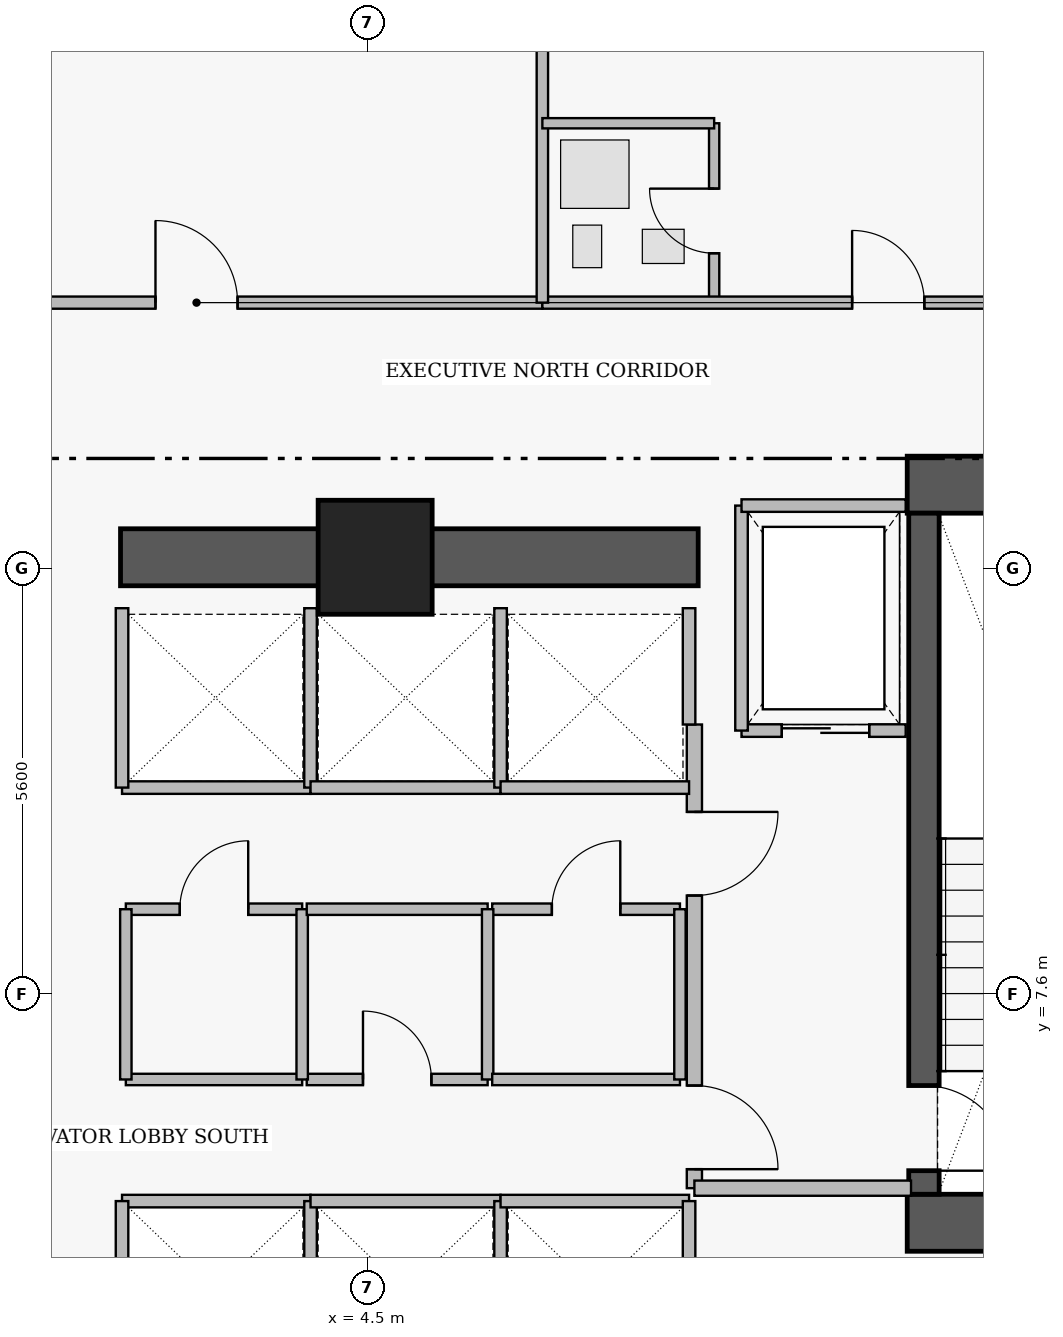
"""IFC4 building model, lengths in metres.
Left out: names, types, materials, properties, quantities, classifications, styles, units other than length and angle.
Written with IfcOpenShell. Run it as: python <this file> out.ifc"""

import sys

from ifc_helpers import new_model, si_unit, direction, frame, frame_2d, origin, origin_2d, place, context, subcontext, project, spatial, rectangle, extrude, element, fill, save


model = new_model("IFC4")
c1 = context("Model", 3, precision=1e-05, world=origin(), true_north=direction((0.0, 1.0)))
c2 = subcontext(c1, "Body", "Model", "MODEL_VIEW")
j1 = project(units=[si_unit("LENGTHUNIT", "METRE"), si_unit("PLANEANGLEUNIT", "RADIAN")], contexts=[c1])
p1 = place(None, origin())
s1 = spatial("IfcSite", under=j1, at=p1, CompositionType="ELEMENT")
p2 = place(p1, origin())
s2 = spatial("IfcBuilding", under=s1, at=p2, CompositionType="ELEMENT")
p3 = place(p2, frame((0.0, 0.0, 128.5)))
s3 = spatial("IfcBuildingStorey", under=s2, at=p3, CompositionType="ELEMENT", Elevation=128.5)
for number, where, z_axis, x_axis in (
    (1, (11.6, 14.305, 0.0), (0.0, 0.0, 1.0), (1.0, 0.0, 0.0)),
    (2, (11.6, 4.595, 0.0), (0.0, 0.0, 1.0), (1.0, 0.0, 0.0)),
):
    element("IfcWall", number, at=place(p3, frame(where, z_axis=z_axis, x_axis=x_axis)), inside=s3, PredefinedType="SHEAR", context=c2, shape_type="SweptSolid", body=[
        extrude(rectangle(XDim=4.56, YDim=0.75, at=frame_2d((2.28, 0.0))), origin(), (0.0, 0.0, 1.0), 3.46),
    ])
p4 = place(p3, frame((1.25, 13.35, 0.0), z_axis=(0.0, 0.0, 1.0), x_axis=(1.0, 0.0, 0.0)))
e3 = element("IfcWall", 3, at=p4, inside=s3, PredefinedType="SHEAR", context=c2, shape_type="SweptSolid", body=[
    extrude(rectangle(XDim=7.6, YDim=0.75, at=frame_2d((3.8, 0.0))), origin(), (0.0, 0.0, 1.0), 3.43),
])
p5 = place(p3, frame((11.82, 13.93, 0.0), z_axis=(0.0, 0.0, 1.0), x_axis=(0.0, -1.0, 0.0)))
e4 = element("IfcWall", 4, at=p5, inside=s3, PredefinedType="SHEAR", context=c2, shape_type="SweptSolid", body=[
    extrude(rectangle(XDim=8.96, YDim=0.4, at=frame_2d((4.48, 0.0))), origin(), (0.0, 0.0, 1.0), 3.46),
])
p6 = place(p5, frame((7.53, 0.0, 0.0)))
e5 = element("IfcOpeningElement", 5, at=p6, cuts=e4, PredefinedType="OPENING", context=c2, shape_type="SweptSolid", body=[
    extrude(rectangle(XDim=1.12, YDim=2.22, at=frame_2d((0.56, 1.11))), frame((0.0, 0.21, 0.0), z_axis=(0.0, -1.0, 0.0), x_axis=(1.0, 0.0, 0.0)), (0.0, 0.0, 1.0), 0.42),
])
p7 = place(p3, frame((4.6, 13.35, 0.0), z_axis=(0.0, 0.0, 1.0), x_axis=(1.0, 0.0, 0.0)))
e6 = element("IfcColumn", 6, at=p7, inside=s3, PredefinedType="COLUMN", context=c2, shape_type="SweptSolid", body=[
    extrude(rectangle(XDim=1.5, YDim=1.5, at=origin_2d()), origin(), (0.0, 0.0, 1.0), 3.65),
])
p8 = place(p3, frame((8.8, 11.15, 0.0), z_axis=(0.0, 0.0, 1.0), x_axis=(0.0, -1.0, 0.0)))
e7 = element("IfcWall", 7, at=p8, inside=s3, PredefinedType="PARTITIONING", context=c2, shape_type="SweptSolid", body=[
    extrude(rectangle(XDim=6.1, YDim=0.2, at=frame_2d((3.05, 0.0))), origin(), (0.0, 0.0, 1.0), 3.43),
])
p9 = place(p8, frame((1.15, 0.0, 0.0)))
e8 = element("IfcOpeningElement", 8, at=p9, cuts=e7, PredefinedType="OPENING", context=c2, shape_type="SweptSolid", body=[
    extrude(rectangle(XDim=1.1, YDim=2.2, at=frame_2d((0.55, 1.1))), frame((0.0, 0.11, 0.0), z_axis=(0.0, -1.0, 0.0), x_axis=(1.0, 0.0, 0.0)), (0.0, 0.0, 1.0), 0.22),
])
p10 = place(p8, frame((4.75, 0.0, 0.0)))
e9 = element("IfcOpeningElement", 9, at=p10, cuts=e7, PredefinedType="OPENING", context=c2, shape_type="SweptSolid", body=[
    extrude(rectangle(XDim=1.1, YDim=2.2, at=frame_2d((0.55, 1.1))), frame((0.0, 0.11, 0.0), z_axis=(0.0, -1.0, 0.0), x_axis=(1.0, 0.0, 0.0)), (0.0, 0.0, 1.0), 0.22),
])
p11 = place(p3, frame((9.42, 11.07, 0.0), z_axis=(0.0, 0.0, 1.0), x_axis=(1.0, 0.0, 0.0)))
e10 = element("IfcWall", 10, at=p11, inside=s3, PredefinedType="PARTITIONING", context=c2, shape_type="SweptSolid", body=[
    extrude(rectangle(XDim=2.16, YDim=0.165, at=frame_2d((1.08, 0.0))), origin(), (0.0, 0.0, 1.0), 3.43),
])
p12 = place(p11, frame((0.53, 0.0, 0.0)))
e11 = element("IfcOpeningElement", 11, at=p12, cuts=e10, PredefinedType="OPENING", context=c2, shape_type="SweptSolid", body=[
    extrude(rectangle(XDim=1.15, YDim=2.25, at=frame_2d((0.575, 1.125))), frame((0.0, 0.093, 0.0), z_axis=(0.0, -1.0, 0.0), x_axis=(1.0, 0.0, 0.0)), (0.0, 0.0, 1.0), 0.185),
])
p13 = place(p3, frame((1.32, 8.72, 0.0), z_axis=(0.0, 0.0, 1.0), x_axis=(1.0, 0.0, 0.0)))
e12 = element("IfcWall", 12, at=p13, inside=s3, PredefinedType="PARTITIONING", context=c2, shape_type="SweptSolid", body=[
    extrude(rectangle(XDim=2.32, YDim=0.15, at=frame_2d((1.16, 0.0))), origin(), (0.0, 0.0, 1.0), 3.43),
])
p14 = place(p13, frame((0.71, 0.0, 0.0)))
e13 = element("IfcOpeningElement", 13, at=p14, cuts=e12, PredefinedType="OPENING", context=c2, shape_type="SweptSolid", body=[
    extrude(rectangle(XDim=0.9, YDim=2.15, at=frame_2d((0.45, 1.075))), frame((0.0, 0.085, 0.0), z_axis=(0.0, -1.0, 0.0), x_axis=(1.0, 0.0, 0.0)), (0.0, 0.0, 1.0), 0.17),
])
p15 = place(p3, frame((3.7, 6.48, 0.0), z_axis=(0.0, 0.0, 1.0), x_axis=(1.0, 0.0, 0.0)))
e14 = element("IfcWall", 14, at=p15, inside=s3, PredefinedType="PARTITIONING", context=c2, shape_type="SweptSolid", body=[
    extrude(rectangle(XDim=2.38, YDim=0.15, at=frame_2d((1.19, 0.0))), origin(), (0.0, 0.0, 1.0), 3.43),
])
p16 = place(p15, frame((0.74, 0.0, 0.0)))
e15 = element("IfcOpeningElement", 15, at=p16, cuts=e14, PredefinedType="OPENING", context=c2, shape_type="SweptSolid", body=[
    extrude(rectangle(XDim=0.9, YDim=2.15, at=frame_2d((0.45, 1.075))), frame((0.0, 0.085, 0.0), z_axis=(0.0, -1.0, 0.0), x_axis=(1.0, 0.0, 0.0)), (0.0, 0.0, 1.0), 0.17),
])
p17 = place(p3, frame((6.14, 8.72, 0.0), z_axis=(0.0, 0.0, 1.0), x_axis=(1.0, 0.0, 0.0)))
e16 = element("IfcWall", 16, at=p17, inside=s3, PredefinedType="PARTITIONING", context=c2, shape_type="SweptSolid", body=[
    extrude(rectangle(XDim=2.47, YDim=0.15, at=frame_2d((1.235, 0.0))), origin(), (0.0, 0.0, 1.0), 3.43),
])
p18 = place(p17, frame((0.785, 0.0, 0.0)))
e17 = element("IfcOpeningElement", 17, at=p18, cuts=e16, PredefinedType="OPENING", context=c2, shape_type="SweptSolid", body=[
    extrude(rectangle(XDim=0.9, YDim=2.15, at=frame_2d((0.45, 1.075))), frame((0.0, 0.085, 0.0), z_axis=(0.0, -1.0, 0.0), x_axis=(1.0, 0.0, 0.0)), (0.0, 0.0, 1.0), 0.17),
])
p19 = place(p3, frame((0.0, 16.7, 0.0), z_axis=(0.0, 0.0, 1.0), x_axis=(1.0, 0.0, 0.0)))
e18 = element("IfcWall", 18, at=p19, inside=s3, PredefinedType="PARTITIONING", context=c2, shape_type="SweptSolid", body=[
    extrude(rectangle(XDim=6.8, YDim=0.16, at=frame_2d((3.4, 0.0))), origin(), (0.0, 0.0, 1.0), 2.973),
])
p20 = place(p19, frame((1.71, 0.0, 0.0)))
e19 = element("IfcOpeningElement", 19, at=p20, cuts=e18, PredefinedType="OPENING", context=c2, shape_type="SweptSolid", body=[
    extrude(rectangle(XDim=1.08, YDim=2.18, at=frame_2d((0.54, 1.09))), frame((0.0, 0.09, 0.0), z_axis=(0.0, -1.0, 0.0), x_axis=(1.0, 0.0, 0.0)), (0.0, 0.0, 1.0), 0.18),
])
p21 = place(p3, frame((9.06, 16.7, 0.0), z_axis=(0.0, 0.0, 1.0), x_axis=(0.0, 1.0, 0.0)))
e20 = element("IfcWall", 20, at=p21, inside=s3, PredefinedType="PLUMBINGWALL", context=c2, shape_type="SweptSolid", body=[
    extrude(rectangle(XDim=2.36, YDim=0.135, at=frame_2d((1.18, 0.0))), origin(), (0.0, 0.0, 1.0), 3.43),
])
p22 = place(p21, frame((0.65, 0.0, 0.0)))
e21 = element("IfcOpeningElement", 21, at=p22, cuts=e20, PredefinedType="OPENING", context=c2, shape_type="SweptSolid", body=[
    extrude(rectangle(XDim=0.85, YDim=2.1, at=frame_2d((0.425, 1.05))), frame((0.0, 0.077, 0.0), z_axis=(0.0, -1.0, 0.0), x_axis=(1.0, 0.0, 0.0)), (0.0, 0.0, 1.0), 0.155),
])
p23 = place(p3, frame((6.8, 16.7, 0.0), z_axis=(0.0, 0.0, 1.0), x_axis=(1.0, 0.0, 0.0)))
e22 = element("IfcWall", 22, at=p23, inside=s3, PredefinedType="PARTITIONING", context=c2, shape_type="SweptSolid", body=[
    extrude(rectangle(XDim=6.8, YDim=0.16, at=frame_2d((3.4, 0.0))), origin(), (0.0, 0.0, 1.0), 2.973),
])
p24 = place(p23, frame((4.075, 0.0, 0.0)))
e23 = element("IfcOpeningElement", 23, at=p24, cuts=e22, PredefinedType="OPENING", context=c2, shape_type="SweptSolid", body=[
    extrude(rectangle(XDim=0.95, YDim=2.15, at=frame_2d((0.475, 1.075))), frame((0.0, 0.09, 0.0), z_axis=(0.0, -1.0, 0.0), x_axis=(1.0, 0.0, 0.0)), (0.0, 0.0, 1.0), 0.18),
])
p25 = place(p3, frame((8.8, 5.05, 0.0), z_axis=(0.0, 0.0, 1.0), x_axis=(1.0, 0.0, 0.0)))
e24 = element("IfcWall", 24, at=p25, inside=s3, PredefinedType="PARTITIONING", context=c2, shape_type="SweptSolid", body=[
    extrude(rectangle(XDim=2.85, YDim=0.2, at=frame_2d((1.425, 0.0))), origin(), (0.0, 0.0, 1.0), 3.43),
])
p26 = place(p3, frame((9.42, 11.07, 0.0), z_axis=(0.0, 0.0, 1.0), x_axis=(0.0, 1.0, 0.0)))
e25 = element("IfcWall", 25, at=p26, inside=s3, PredefinedType="PARTITIONING", context=c2, shape_type="SweptSolid", body=[
    extrude(rectangle(XDim=2.96, YDim=0.165, at=frame_2d((1.48, 0.0))), origin(), (0.0, 0.0, 1.0), 3.43),
])
p27 = place(p3, frame((9.42, 14.03, 0.0), z_axis=(0.0, 0.0, 1.0), x_axis=(1.0, 0.0, 0.0)))
e26 = element("IfcWall", 26, at=p27, inside=s3, PredefinedType="PARTITIONING", context=c2, shape_type="SweptSolid", body=[
    extrude(rectangle(XDim=2.16, YDim=0.165, at=frame_2d((1.08, 0.0))), origin(), (0.0, 0.0, 1.0), 3.43),
])
p28 = place(p3, frame((1.27, 4.88, 0.0), z_axis=(0.0, 0.0, 1.0), x_axis=(1.0, 0.0, 0.0)))
e27 = element("IfcWall", 27, at=p28, inside=s3, PredefinedType="PARTITIONING", context=c2, shape_type="SweptSolid", body=[
    extrude(rectangle(XDim=2.48, YDim=0.165, at=frame_2d((1.24, 0.0))), origin(), (0.0, 0.0, 1.0), 3.43),
])
for number, where, z_axis, x_axis in (
    (28, (1.27, 2.52, 0.0), (0.0, 0.0, 1.0), (0.0, 1.0, 0.0)),
    (29, (3.75, 2.52, 0.0), (0.0, 0.0, 1.0), (0.0, 1.0, 0.0)),
):
    element("IfcWall", number, at=place(p3, frame(where, z_axis=z_axis, x_axis=x_axis)), inside=s3, PredefinedType="PARTITIONING", context=c2, shape_type="SweptSolid", body=[
        extrude(rectangle(XDim=2.36, YDim=0.165, at=frame_2d((1.18, 0.0))), origin(), (0.0, 0.0, 1.0), 3.43),
    ])
p29 = place(p3, frame((1.27, 10.32, 0.0), z_axis=(0.0, 0.0, 1.0), x_axis=(1.0, 0.0, 0.0)))
e30 = element("IfcWall", 30, at=p29, inside=s3, PredefinedType="PARTITIONING", context=c2, shape_type="SweptSolid", body=[
    extrude(rectangle(XDim=2.48, YDim=0.165, at=frame_2d((1.24, 0.0))), origin(), (0.0, 0.0, 1.0), 3.43),
])
for number, where, z_axis, x_axis in (
    (31, (1.27, 10.32, 0.0), (0.0, 0.0, 1.0), (0.0, 1.0, 0.0)),
    (32, (3.75, 10.32, 0.0), (0.0, 0.0, 1.0), (0.0, 1.0, 0.0)),
):
    element("IfcWall", number, at=place(p3, frame(where, z_axis=z_axis, x_axis=x_axis)), inside=s3, PredefinedType="PARTITIONING", context=c2, shape_type="SweptSolid", body=[
        extrude(rectangle(XDim=2.36, YDim=0.165, at=frame_2d((1.18, 0.0))), origin(), (0.0, 0.0, 1.0), 3.43),
    ])
p30 = place(p3, frame((3.75, 4.88, 0.0), z_axis=(0.0, 0.0, 1.0), x_axis=(1.0, 0.0, 0.0)))
e33 = element("IfcWall", 33, at=p30, inside=s3, PredefinedType="PARTITIONING", context=c2, shape_type="SweptSolid", body=[
    extrude(rectangle(XDim=2.5, YDim=0.165, at=frame_2d((1.25, 0.0))), origin(), (0.0, 0.0, 1.0), 3.43),
])
p31 = place(p3, frame((6.25, 2.52, 0.0), z_axis=(0.0, 0.0, 1.0), x_axis=(0.0, 1.0, 0.0)))
e34 = element("IfcWall", 34, at=p31, inside=s3, PredefinedType="PARTITIONING", context=c2, shape_type="SweptSolid", body=[
    extrude(rectangle(XDim=2.36, YDim=0.165, at=frame_2d((1.18, 0.0))), origin(), (0.0, 0.0, 1.0), 3.43),
])
p32 = place(p3, frame((6.25, 4.88, 0.0), z_axis=(0.0, 0.0, 1.0), x_axis=(1.0, 0.0, 0.0)))
e35 = element("IfcWall", 35, at=p32, inside=s3, PredefinedType="PARTITIONING", context=c2, shape_type="SweptSolid", body=[
    extrude(rectangle(XDim=2.48, YDim=0.165, at=frame_2d((1.24, 0.0))), origin(), (0.0, 0.0, 1.0), 3.43),
])
p33 = place(p3, frame((8.73, 2.52, 0.0), z_axis=(0.0, 0.0, 1.0), x_axis=(0.0, 1.0, 0.0)))
e36 = element("IfcWall", 36, at=p33, inside=s3, PredefinedType="PARTITIONING", context=c2, shape_type="SweptSolid", body=[
    extrude(rectangle(XDim=2.36, YDim=0.165, at=frame_2d((1.18, 0.0))), origin(), (0.0, 0.0, 1.0), 3.43),
])
p34 = place(p3, frame((3.75, 10.32, 0.0), z_axis=(0.0, 0.0, 1.0), x_axis=(1.0, 0.0, 0.0)))
e37 = element("IfcWall", 37, at=p34, inside=s3, PredefinedType="PARTITIONING", context=c2, shape_type="SweptSolid", body=[
    extrude(rectangle(XDim=2.5, YDim=0.165, at=frame_2d((1.25, 0.0))), origin(), (0.0, 0.0, 1.0), 3.43),
])
p35 = place(p3, frame((6.25, 10.32, 0.0), z_axis=(0.0, 0.0, 1.0), x_axis=(0.0, 1.0, 0.0)))
e38 = element("IfcWall", 38, at=p35, inside=s3, PredefinedType="PARTITIONING", context=c2, shape_type="SweptSolid", body=[
    extrude(rectangle(XDim=2.36, YDim=0.165, at=frame_2d((1.18, 0.0))), origin(), (0.0, 0.0, 1.0), 3.43),
])
p36 = place(p3, frame((6.25, 10.32, 0.0), z_axis=(0.0, 0.0, 1.0), x_axis=(1.0, 0.0, 0.0)))
e39 = element("IfcWall", 39, at=p36, inside=s3, PredefinedType="PARTITIONING", context=c2, shape_type="SweptSolid", body=[
    extrude(rectangle(XDim=2.48, YDim=0.165, at=frame_2d((1.24, 0.0))), origin(), (0.0, 0.0, 1.0), 3.43),
])
p37 = place(p3, frame((8.73, 11.15, 0.0), z_axis=(0.0, 0.0, 1.0), x_axis=(0.0, 1.0, 0.0)))
e40 = element("IfcWall", 40, at=p37, inside=s3, PredefinedType="PARTITIONING", context=c2, shape_type="SweptSolid", body=[
    extrude(rectangle(XDim=1.53, YDim=0.165, at=frame_2d((0.765, 0.0))), origin(), (0.0, 0.0, 1.0), 3.43),
])
p38 = place(p3, frame((1.32, 6.48, 0.0), z_axis=(0.0, 0.0, 1.0), x_axis=(1.0, 0.0, 0.0)))
e41 = element("IfcWall", 41, at=p38, inside=s3, PredefinedType="PARTITIONING", context=c2, shape_type="SweptSolid", body=[
    extrude(rectangle(XDim=2.32, YDim=0.15, at=frame_2d((1.16, 0.0))), origin(), (0.0, 0.0, 1.0), 3.43),
])
for number, where, z_axis, x_axis in (
    (42, (1.32, 6.48, 0.0), (0.0, 0.0, 1.0), (0.0, 1.0, 0.0)),
    (43, (3.64, 6.48, 0.0), (0.0, 0.0, 1.0), (0.0, 1.0, 0.0)),
):
    element("IfcWall", number, at=place(p3, frame(where, z_axis=z_axis, x_axis=x_axis)), inside=s3, PredefinedType="PARTITIONING", context=c2, shape_type="SweptSolid", body=[
        extrude(rectangle(XDim=2.24, YDim=0.15, at=frame_2d((1.12, 0.0))), origin(), (0.0, 0.0, 1.0), 3.43),
    ])
p39 = place(p3, frame((3.7, 8.72, 0.0), z_axis=(0.0, 0.0, 1.0), x_axis=(1.0, 0.0, 0.0)))
e44 = element("IfcWall", 44, at=p39, inside=s3, PredefinedType="PARTITIONING", context=c2, shape_type="SweptSolid", body=[
    extrude(rectangle(XDim=2.38, YDim=0.15, at=frame_2d((1.19, 0.0))), origin(), (0.0, 0.0, 1.0), 3.43),
])
p40 = place(p3, frame((6.08, 6.48, 0.0), z_axis=(0.0, 0.0, 1.0), x_axis=(0.0, 1.0, 0.0)))
e45 = element("IfcWall", 45, at=p40, inside=s3, PredefinedType="PARTITIONING", context=c2, shape_type="SweptSolid", body=[
    extrude(rectangle(XDim=2.24, YDim=0.15, at=frame_2d((1.12, 0.0))), origin(), (0.0, 0.0, 1.0), 3.43),
])
p41 = place(p3, frame((6.14, 6.48, 0.0), z_axis=(0.0, 0.0, 1.0), x_axis=(1.0, 0.0, 0.0)))
e46 = element("IfcWall", 46, at=p41, inside=s3, PredefinedType="PARTITIONING", context=c2, shape_type="SweptSolid", body=[
    extrude(rectangle(XDim=2.47, YDim=0.15, at=frame_2d((1.235, 0.0))), origin(), (0.0, 0.0, 1.0), 3.43),
])
p42 = place(p3, frame((8.61, 6.48, 0.0), z_axis=(0.0, 0.0, 1.0), x_axis=(0.0, 1.0, 0.0)))
e47 = element("IfcWall", 47, at=p42, inside=s3, PredefinedType="PARTITIONING", context=c2, shape_type="SweptSolid", body=[
    extrude(rectangle(XDim=2.24, YDim=0.15, at=frame_2d((1.12, 0.0))), origin(), (0.0, 0.0, 1.0), 3.43),
])
p43 = place(p3, frame((6.8, 16.7, 0.0), z_axis=(0.0, 0.0, 1.0), x_axis=(0.0, 1.0, 0.0)))
e48 = element("IfcWall", 48, at=p43, inside=s3, PredefinedType="PARTITIONING", context=c2, shape_type="SweptSolid", body=[
    extrude(rectangle(XDim=11.64, YDim=0.15, at=frame_2d((5.82, 0.0))), origin(), (0.0, 0.0, 1.0), 3.43),
])
p44 = place(p3, frame((6.8, 19.06, 0.0), z_axis=(0.0, 0.0, 1.0), x_axis=(1.0, 0.0, 0.0)))
e49 = element("IfcWall", 49, at=p44, inside=s3, PredefinedType="PLUMBINGWALL", context=c2, shape_type="SweptSolid", body=[
    extrude(rectangle(XDim=2.26, YDim=0.135, at=frame_2d((1.13, 0.0))), origin(), (0.0, 0.0, 1.0), 2.973),
])
p45 = place(p6, origin())
e50 = element("IfcDoor", 50, at=p45, inside=s3, OperationType="SINGLE_SWING_RIGHT", PredefinedType="DOOR", context=c2, shape_type="SweptSolid", body=[
    extrude(rectangle(XDim=1.12, YDim=2.22, at=frame_2d((0.56, 1.11))), frame((0.0, 0.025, 0.0), z_axis=(0.0, -1.0, 0.0), x_axis=(1.0, 0.0, 0.0)), (0.0, 0.0, 1.0), 0.05),
])
fill(e5, e50)
p46 = place(p9, origin())
e51 = element("IfcDoor", 51, at=p46, inside=s3, OperationType="SINGLE_SWING_LEFT", PredefinedType="DOOR", context=c2, shape_type="SweptSolid", body=[
    extrude(rectangle(XDim=1.1, YDim=2.2, at=frame_2d((0.55, 1.1))), frame((0.0, 0.025, 0.0), z_axis=(0.0, -1.0, 0.0), x_axis=(1.0, 0.0, 0.0)), (0.0, 0.0, 1.0), 0.05),
])
fill(e8, e51)
p47 = place(p10, origin())
e52 = element("IfcDoor", 52, at=p47, inside=s3, OperationType="SINGLE_SWING_RIGHT", PredefinedType="DOOR", context=c2, shape_type="SweptSolid", body=[
    extrude(rectangle(XDim=1.1, YDim=2.2, at=frame_2d((0.55, 1.1))), frame((0.0, 0.025, 0.0), z_axis=(0.0, -1.0, 0.0), x_axis=(1.0, 0.0, 0.0)), (0.0, 0.0, 1.0), 0.05),
])
fill(e9, e52)
p48 = place(p12, origin())
e53 = element("IfcDoor", 53, at=p48, inside=s3, OperationType="SLIDING_TO_LEFT", PredefinedType="DOOR", context=c2, shape_type="SweptSolid", body=[
    extrude(rectangle(XDim=1.15, YDim=2.25, at=frame_2d((0.575, 1.125))), frame((0.0, 0.025, 0.0), z_axis=(0.0, -1.0, 0.0), x_axis=(1.0, 0.0, 0.0)), (0.0, 0.0, 1.0), 0.05),
])
fill(e11, e53)
p49 = place(p14, origin())
e54 = element("IfcDoor", 54, at=p49, inside=s3, OperationType="SINGLE_SWING_RIGHT", PredefinedType="DOOR", context=c2, shape_type="SweptSolid", body=[
    extrude(rectangle(XDim=0.9, YDim=2.15, at=frame_2d((0.45, 1.075))), frame((0.0, 0.025, 0.0), z_axis=(0.0, -1.0, 0.0), x_axis=(1.0, 0.0, 0.0)), (0.0, 0.0, 1.0), 0.05),
])
fill(e13, e54)
p50 = place(p16, origin())
e55 = element("IfcDoor", 55, at=p50, inside=s3, OperationType="SINGLE_SWING_LEFT", PredefinedType="DOOR", context=c2, shape_type="SweptSolid", body=[
    extrude(rectangle(XDim=0.9, YDim=2.15, at=frame_2d((0.45, 1.075))), frame((0.0, 0.025, 0.0), z_axis=(0.0, -1.0, 0.0), x_axis=(1.0, 0.0, 0.0)), (0.0, 0.0, 1.0), 0.05),
])
fill(e15, e55)
p51 = place(p18, origin())
e56 = element("IfcDoor", 56, at=p51, inside=s3, OperationType="SINGLE_SWING_RIGHT", PredefinedType="DOOR", context=c2, shape_type="SweptSolid", body=[
    extrude(rectangle(XDim=0.9, YDim=2.15, at=frame_2d((0.45, 1.075))), frame((0.0, 0.025, 0.0), z_axis=(0.0, -1.0, 0.0), x_axis=(1.0, 0.0, 0.0)), (0.0, 0.0, 1.0), 0.05),
])
fill(e17, e56)
p52 = place(p20, origin())
e57 = element("IfcDoor", 57, at=p52, inside=s3, OperationType="SINGLE_SWING_LEFT", PredefinedType="DOOR", context=c2, shape_type="SweptSolid", body=[
    extrude(rectangle(XDim=1.08, YDim=2.18, at=frame_2d((0.54, 1.09))), frame((0.0, 0.025, 0.0), z_axis=(0.0, -1.0, 0.0), x_axis=(1.0, 0.0, 0.0)), (0.0, 0.0, 1.0), 0.05),
])
fill(e19, e57)
p53 = place(p22, origin())
e58 = element("IfcDoor", 58, at=p53, inside=s3, OperationType="SINGLE_SWING_RIGHT", PredefinedType="DOOR", context=c2, shape_type="SweptSolid", body=[
    extrude(rectangle(XDim=0.85, YDim=2.1, at=frame_2d((0.425, 1.05))), frame((0.0, 0.025, 0.0), z_axis=(0.0, -1.0, 0.0), x_axis=(1.0, 0.0, 0.0)), (0.0, 0.0, 1.0), 0.05),
])
fill(e21, e58)
p54 = place(p24, origin())
e59 = element("IfcDoor", 59, at=p54, inside=s3, OperationType="SINGLE_SWING_LEFT", PredefinedType="DOOR", context=c2, shape_type="SweptSolid", body=[
    extrude(rectangle(XDim=0.95, YDim=2.15, at=frame_2d((0.475, 1.075))), frame((0.0, 0.025, 0.0), z_axis=(0.0, -1.0, 0.0), x_axis=(1.0, 0.0, 0.0)), (0.0, 0.0, 1.0), 0.05),
])
fill(e23, e59)
save(model, sys.argv[1])
